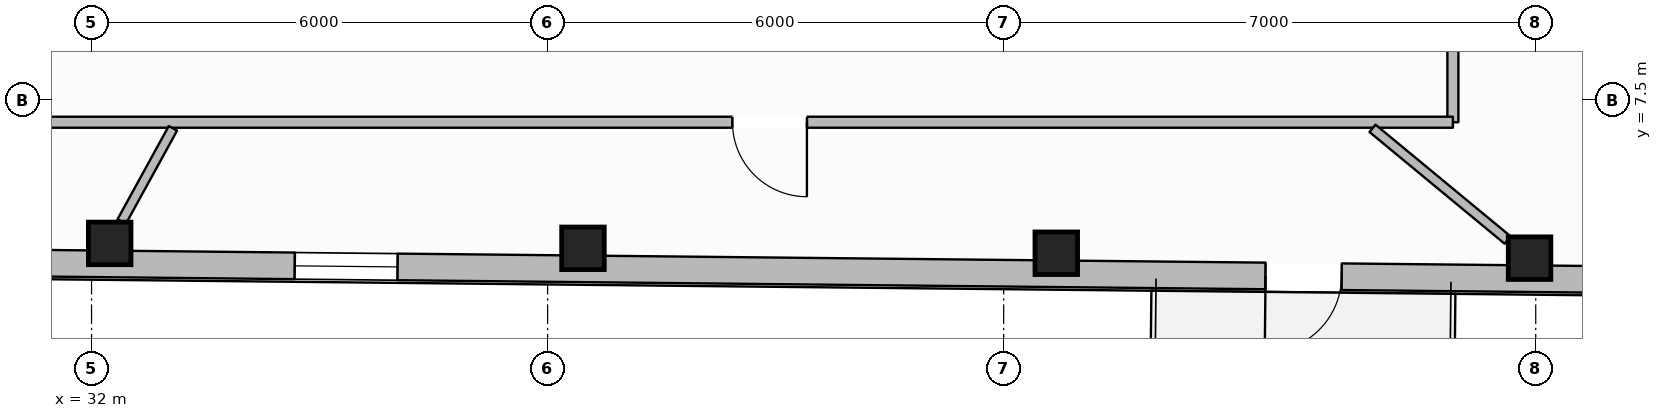
"""IFC4 building model, lengths in metres.
Left out: names, types, materials, properties, quantities, classifications, styles, units other than length and angle.
Written with IfcOpenShell. Run it as: python <this file> out.ifc"""

import sys

from ifc_helpers import new_model, si_unit, direction, frame, frame_2d, origin, origin_2d, place, context, subcontext, project, spatial, rectangle, hollow_rectangle, extrude, element, fill, save


model = new_model("IFC4")
c1 = context("Model", 3, precision=1e-05, world=origin(), true_north=direction((0.0, 1.0)))
c2 = subcontext(c1, "Body", "Model", "MODEL_VIEW")
j1 = project(units=[si_unit("LENGTHUNIT", "METRE"), si_unit("PLANEANGLEUNIT", "RADIAN")], contexts=[c1])
p1 = place(None, origin())
s1 = spatial("IfcSite", under=j1, at=p1, CompositionType="ELEMENT")
p2 = place(p1, origin())
s2 = spatial("IfcBuilding", under=s1, at=p2, CompositionType="ELEMENT")
p3 = place(p2, frame((0.0, 0.0, 262.6)))
s3 = spatial("IfcBuildingStorey", under=s2, at=p3, CompositionType="ELEMENT", Elevation=262.6)
for number, where, z_axis, x_axis in (
    (1, (32.239, 5.616, 0.0), (0.0, 0.0, 1.0), (1.0, 0.0, 0.0)),
    (2, (38.465, 5.551, 0.0), (0.0, 0.0, 1.0), (1.0, 0.0, 0.0)),
    (3, (44.692, 5.486, 0.0), (0.0, 0.0, 1.0), (1.0, 0.0, 0.0)),
    (4, (50.919, 5.422, 0.0), (0.0, 0.0, 1.0), (1.0, 0.0, 0.0)),
):
    element("IfcColumn", number, at=place(p3, frame(where, z_axis=z_axis, x_axis=x_axis)), inside=s3, PredefinedType="COLUMN", context=c2, shape_type="SweptSolid", body=[
        extrude(hollow_rectangle(XDim=0.56, YDim=0.56, WallThickness=0.025, at=origin_2d()), origin(), (0.0, 0.0, 1.0), 3.61),
    ])
p4 = place(p3, frame((57.623, 5.082, 0.0), z_axis=(0.0, 0.0, 1.0), x_axis=(-0.999946058155, 0.010386567308, 0.0)))
e5 = element("IfcWall", 5, at=p4, inside=s3, PredefinedType="STANDARD", context=c2, shape_type="SweptSolid", body=[
    extrude(rectangle(XDim=38.314, YDim=0.35, at=frame_2d((19.157, 0.0))), origin(), (0.0, 0.0, 1.0), 3.196),
])
p5 = place(p4, frame((9.178, 0.0, 0.0)))
e6 = element("IfcOpeningElement", 6, at=p5, cuts=e5, PredefinedType="OPENING", context=c2, shape_type="SweptSolid", body=[
    extrude(rectangle(XDim=1.0, YDim=2.2, at=frame_2d((0.5, 1.1))), frame((0.0, 0.185, 0.0), z_axis=(0.0, -1.0, 0.0), x_axis=(1.0, 0.0, 0.0)), (0.0, 0.0, 1.0), 0.37),
])
p6 = place(p4, frame((34.054, 0.0, 0.65)))
e7 = element("IfcOpeningElement", 7, at=p6, cuts=e5, PredefinedType="OPENING", context=c2, shape_type="SweptSolid", body=[
    extrude(rectangle(XDim=1.35, YDim=1.75, at=frame_2d((0.675, 0.875))), frame((0.0, 0.185, 0.0), z_axis=(0.0, -1.0, 0.0), x_axis=(1.0, 0.0, 0.0)), (0.0, 0.0, 1.0), 0.37),
])
p7 = place(p4, frame((27.827, 0.0, 0.65)))
e8 = element("IfcOpeningElement", 8, at=p7, cuts=e5, PredefinedType="OPENING", context=c2, shape_type="SweptSolid", body=[
    extrude(rectangle(XDim=1.35, YDim=1.75, at=frame_2d((0.675, 0.875))), frame((0.0, 0.185, 0.0), z_axis=(0.0, -1.0, 0.0), x_axis=(1.0, 0.0, 0.0)), (0.0, 0.0, 1.0), 0.37),
])
p8 = place(p4, frame((21.601, 0.0, 0.65)))
e9 = element("IfcOpeningElement", 9, at=p8, cuts=e5, PredefinedType="OPENING", context=c2, shape_type="SweptSolid", body=[
    extrude(rectangle(XDim=1.35, YDim=1.75, at=frame_2d((0.675, 0.875))), frame((0.0, 0.185, 0.0), z_axis=(0.0, -1.0, 0.0), x_axis=(1.0, 0.0, 0.0)), (0.0, 0.0, 1.0), 0.37),
])
p9 = place(p4, frame((2.919, 0.0, 0.65)))
e10 = element("IfcOpeningElement", 10, at=p9, cuts=e5, PredefinedType="OPENING", context=c2, shape_type="SweptSolid", body=[
    extrude(rectangle(XDim=1.35, YDim=1.75, at=frame_2d((0.675, 0.875))), frame((0.0, 0.185, 0.0), z_axis=(0.0, -1.0, 0.0), x_axis=(1.0, 0.0, 0.0)), (0.0, 0.0, 1.0), 0.37),
])
p10 = place(p3, frame((49.91, 12.15, 0.0), z_axis=(0.0, 0.0, 1.0), x_axis=(0.0, -1.0, 0.0)))
e11 = element("IfcWall", 11, at=p10, inside=s3, PredefinedType="PARTITIONING", context=c2, shape_type="SweptSolid", body=[
    extrude(rectangle(XDim=4.94, YDim=0.145, at=frame_2d((2.47, 0.0))), origin(), (0.0, 0.0, 1.0), 3.61),
])
p11 = place(p3, frame((49.91, 7.21, 0.0), z_axis=(0.0, 0.0, 1.0), x_axis=(-1.0, 0.0, 0.0)))
e12 = element("IfcWall", 12, at=p11, inside=s3, PredefinedType="PARTITIONING", context=c2, shape_type="SweptSolid", body=[
    extrude(rectangle(XDim=23.82, YDim=0.145, at=frame_2d((11.91, 0.0))), origin(), (0.0, 0.0, 1.0), 3.61),
])
p12 = place(p11, frame((8.499, 0.0, 0.0)))
e13 = element("IfcOpeningElement", 13, at=p12, cuts=e12, PredefinedType="OPENING", context=c2, shape_type="SweptSolid", body=[
    extrude(rectangle(XDim=0.98, YDim=2.15, at=frame_2d((0.49, 1.075))), frame((0.0, 0.083, 0.0), z_axis=(0.0, -1.0, 0.0), x_axis=(1.0, 0.0, 0.0)), (0.0, 0.0, 1.0), 0.165),
])
p13 = place(p3, frame((33.071, 7.129, 0.0), z_axis=(0.0, 0.0, 1.0), x_axis=(-0.481650666778, -0.876363300916, 0.0)))
e14 = element("IfcWall", 14, at=p13, inside=s3, PredefinedType="PARTITIONING", context=c2, shape_type="SweptSolid", body=[
    extrude(rectangle(XDim=1.398, YDim=0.125, at=frame_2d((0.699, 0.0))), origin(), (0.0, 0.0, 1.0), 3.61),
])
p14 = place(p3, frame((48.853, 7.129, 0.0), z_axis=(0.0, 0.0, 1.0), x_axis=(0.770826164976, -0.637045542632, 0.0)))
e15 = element("IfcWall", 15, at=p14, inside=s3, PredefinedType="PARTITIONING", context=c2, shape_type="SweptSolid", body=[
    extrude(rectangle(XDim=2.307, YDim=0.125, at=frame_2d((1.153, 0.0))), origin(), (0.0, 0.0, 1.0), 3.246),
])
p15 = place(p5, origin())
e16 = element("IfcDoor", 16, at=p15, inside=s3, OperationType="SINGLE_SWING_RIGHT", PredefinedType="DOOR", context=c2, shape_type="SweptSolid", body=[
    extrude(rectangle(XDim=1.0, YDim=2.2, at=frame_2d((0.5, 1.1))), frame((0.0, 0.025, 0.0), z_axis=(0.0, -1.0, 0.0), x_axis=(1.0, 0.0, 0.0)), (0.0, 0.0, 1.0), 0.05),
])
fill(e6, e16)
p16 = place(p8, origin())
e17 = element("IfcWindow", 17, at=p16, inside=s3, PartitioningType="SINGLE_PANEL", PredefinedType="WINDOW", context=c2, shape_type="SweptSolid", body=[
    extrude(rectangle(XDim=1.35, YDim=1.75, at=frame_2d((0.675, 0.875))), frame((0.0, 0.03, 0.0), z_axis=(0.0, -1.0, 0.0), x_axis=(1.0, 0.0, 0.0)), (0.0, 0.0, 1.0), 0.06),
])
fill(e9, e17)
p17 = place(p12, origin())
e18 = element("IfcDoor", 18, at=p17, inside=s3, OperationType="SINGLE_SWING_LEFT", PredefinedType="DOOR", context=c2, shape_type="SweptSolid", body=[
    extrude(rectangle(XDim=0.98, YDim=2.15, at=frame_2d((0.49, 1.075))), frame((0.0, 0.025, 0.0), z_axis=(0.0, -1.0, 0.0), x_axis=(1.0, 0.0, 0.0)), (0.0, 0.0, 1.0), 0.05),
])
fill(e13, e18)
save(model, sys.argv[1])
